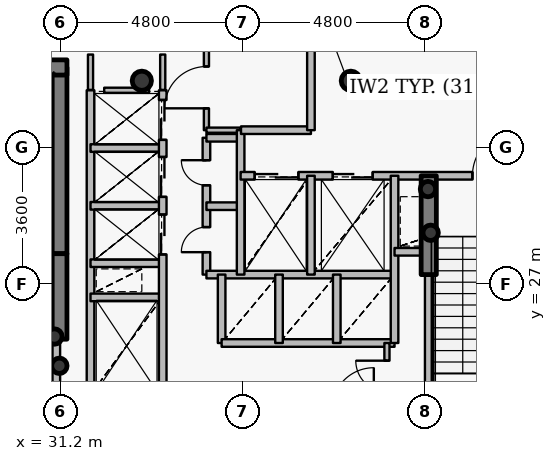
"""IFC4 building model, lengths in metres.
Left out: names, types, materials, properties, quantities, classifications, styles, units other than length and angle.
Written with IfcOpenShell. Run it as: python <this file> out.ifc"""

import sys

from ifc_helpers import new_model, si_unit, direction, frame, frame_2d, origin, origin_2d, place, context, subcontext, project, spatial, rectangle, hollow_circle, extrude, source, transform, mapped, element, fill, save


model = new_model("IFC4")
c1 = context("Model", 3, precision=1e-05, world=origin(), true_north=direction((0.0, 1.0)))
c2 = subcontext(c1, "Body", "Model", "MODEL_VIEW")
j1 = project(units=[si_unit("LENGTHUNIT", "METRE"), si_unit("PLANEANGLEUNIT", "RADIAN")], contexts=[c1])
p1 = place(None, origin())
s1 = spatial("IfcSite", under=j1, at=p1, CompositionType="ELEMENT")
p2 = place(p1, origin())
s2 = spatial("IfcBuilding", under=s1, at=p2, CompositionType="ELEMENT")
p3 = place(p2, frame((0.0, 0.0, 229.05)))
s3 = spatial("IfcBuildingStorey", under=s2, at=p3, CompositionType="ELEMENT", Elevation=229.05)
for number, where, z_axis, x_axis in (
    (1, (38.85, 32.35, 0.0), (0.0, 0.0, 1.0), (1.0, 0.0, 0.0)),
    (2, (33.35, 32.35, 0.0), (0.0, 0.0, 1.0), (1.0, 0.0, 0.0)),
):
    element("IfcColumn", number, at=place(p3, frame(where, z_axis=z_axis, x_axis=x_axis)), inside=s3, PredefinedType="COLUMN", context=c2, shape_type="SweptSolid", body=[
        extrude(hollow_circle(Radius=0.254, WallThickness=0.02, at=origin_2d()), origin(), (0.0, 0.0, 1.0), 3.75),
    ])
p4 = place(p3, frame((31.18, 27.8, 0.0), z_axis=(0.0, 0.0, 1.0), x_axis=(0.0, 1.0, 0.0)))
e3 = element("IfcWall", 3, at=p4, inside=s3, PredefinedType="SHEAR", context=c2, shape_type="SweptSolid", body=[
    extrude(rectangle(XDim=4.9, YDim=0.4, at=frame_2d((2.45, 0.0))), origin(), (0.0, 0.0, 1.0), 3.75),
])
p5 = place(p3, frame((27.28, 32.7, 0.0), z_axis=(0.0, 0.0, 1.0), x_axis=(1.0, 0.0, 0.0)))
e4 = element("IfcWall", 4, at=p5, inside=s3, PredefinedType="SHEAR", context=c2, shape_type="SweptSolid", body=[
    extrude(rectangle(XDim=4.1, YDim=0.4, at=frame_2d((2.05, 0.0))), origin(), (0.0, 0.0, 1.0), 3.75),
])
for number, where, z_axis, x_axis in (
    (5, (31.05, 25.62, 0.0), (0.0, 0.0, 1.0), (1.0, 0.0, 0.0)),
    (6, (31.18, 24.85, 0.0), (0.0, 0.0, 1.0), (1.0, 0.0, 0.0)),
    (7, (40.95, 28.35, 0.0), (0.0, 0.0, 1.0), (1.0, 0.0, 0.0)),
    (8, (40.88, 29.5, 0.0), (0.0, 0.0, 1.0), (1.0, 0.0, 0.0)),
):
    element("IfcColumn", number, at=place(p3, frame(where, z_axis=z_axis, x_axis=x_axis)), inside=s3, PredefinedType="COLUMN", context=c2, shape_type="SweptSolid", body=[
        extrude(hollow_circle(Radius=0.203, WallThickness=0.016, at=origin_2d()), origin(), (0.0, 0.0, 1.0), 3.75),
    ])
p6 = place(p3, frame((31.18, 25.55, 0.0), z_axis=(0.0, 0.0, 1.0), x_axis=(0.0, 1.0, 0.0)))
e9 = element("IfcWall", 9, at=p6, inside=s3, PredefinedType="SHEAR", context=c2, shape_type="SweptSolid", body=[
    extrude(rectangle(XDim=2.25, YDim=0.4, at=frame_2d((1.125, 0.0))), origin(), (0.0, 0.0, 1.0), 3.1),
])
p7 = place(p3, frame((40.9, 27.25, 0.0), z_axis=(0.0, 0.0, 1.0), x_axis=(0.0, 1.0, 0.0)))
e10 = element("IfcWall", 10, at=p7, inside=s3, PredefinedType="SHEAR", context=c2, shape_type="SweptSolid", body=[
    extrude(rectangle(XDim=2.6, YDim=0.4, at=frame_2d((1.3, 0.0))), origin(), (0.0, 0.0, 1.0), 3.1),
])
p8 = place(p3, frame((31.1, 24.1, 0.0), z_axis=(0.0, 0.0, 1.0), x_axis=(0.0, 1.0, 0.0)))
e11 = element("IfcWall", 11, at=p8, inside=s3, PredefinedType="PARTITIONING", context=c2, shape_type="SweptSolid", body=[
    extrude(rectangle(XDim=1.44, YDim=0.2, at=frame_2d((0.72, 0.0))), origin(), (0.0, 0.0, 1.0), 3.5),
])
p9 = place(p3, frame((32.0, 24.1, 0.0), z_axis=(0.0, 0.0, 1.0), x_axis=(0.0, 1.0, 0.0)))
e12 = element("IfcWall", 12, at=p9, inside=s3, PredefinedType="PARTITIONING", context=c2, shape_type="SweptSolid", body=[
    extrude(rectangle(XDim=8.0, YDim=0.2, at=frame_2d((4.0, 0.0))), origin(), (0.0, 0.0, 1.0), 3.5),
])
for number, where, z_axis, x_axis in (
    (13, (32.0, 26.65, 0.0), (0.0, 0.0, 1.0), (1.0, 0.0, 0.0)),
    (14, (32.0, 27.55, 0.0), (0.0, 0.0, 1.0), (1.0, 0.0, 0.0)),
    (15, (32.0, 29.06, 0.0), (0.0, 0.0, 1.0), (1.0, 0.0, 0.0)),
    (16, (32.0, 30.58, 0.0), (0.0, 0.0, 1.0), (1.0, 0.0, 0.0)),
):
    element("IfcWall", number, at=place(p3, frame(where, z_axis=z_axis, x_axis=x_axis)), inside=s3, PredefinedType="PARTITIONING", context=c2, shape_type="SweptSolid", body=[
        extrude(rectangle(XDim=1.9, YDim=0.2, at=frame_2d((0.95, 0.0))), origin(), (0.0, 0.0, 1.0), 3.085),
    ])
p10 = place(p3, frame((33.9, 20.7, 0.0), z_axis=(0.0, 0.0, 1.0), x_axis=(0.0, 1.0, 0.0)))
e17 = element("IfcWall", 17, at=p10, inside=s3, PredefinedType="PARTITIONING", context=c2, shape_type="SweptSolid", body=[
    extrude(rectangle(XDim=11.4, YDim=0.2, at=frame_2d((5.7, 0.0))), origin(), (0.0, 0.0, 1.0), 3.085),
])
p11 = place(p10, frame((7.08, 0.0, 0.0)))
e18 = element("IfcOpeningElement", 18, at=p11, cuts=e17, PredefinedType="OPENING", context=c2, shape_type="SweptSolid", body=[
    extrude(rectangle(XDim=1.05, YDim=2.15, at=origin_2d()), frame((0.525, 0.11, 1.075), z_axis=(0.0, -1.0, 0.0), x_axis=(1.0, 0.0, 0.0)), (0.0, 0.0, 1.0), 0.22),
])
p12 = place(p10, frame((8.595, 0.0, 0.0)))
e19 = element("IfcOpeningElement", 19, at=p12, cuts=e17, PredefinedType="OPENING", context=c2, shape_type="SweptSolid", body=[
    extrude(rectangle(XDim=1.05, YDim=2.15, at=origin_2d()), frame((0.525, 0.11, 1.075), z_axis=(0.0, -1.0, 0.0), x_axis=(1.0, 0.0, 0.0)), (0.0, 0.0, 1.0), 0.22),
])
p13 = place(p10, frame((10.095, 0.0, 0.0)))
e20 = element("IfcOpeningElement", 20, at=p13, cuts=e17, PredefinedType="OPENING", context=c2, shape_type="SweptSolid", body=[
    extrude(rectangle(XDim=1.05, YDim=2.15, at=origin_2d()), frame((0.525, 0.11, 1.075), z_axis=(0.0, -1.0, 0.0), x_axis=(1.0, 0.0, 0.0)), (0.0, 0.0, 1.0), 0.22),
])
p14 = place(p3, frame((35.05, 27.25, 0.0), z_axis=(0.0, 0.0, 1.0), x_axis=(0.0, 1.0, 0.0)))
e21 = element("IfcWall", 21, at=p14, inside=s3, PredefinedType="PARTITIONING", context=c2, shape_type="SweptSolid", body=[
    extrude(rectangle(XDim=3.6, YDim=0.2, at=frame_2d((1.8, 0.0))), origin(), (0.0, 0.0, 1.0), 3.5),
])
p15 = place(p14, frame((0.59, 0.0, 0.0)))
e22 = element("IfcOpeningElement", 22, at=p15, cuts=e21, PredefinedType="OPENING", context=c2, shape_type="SweptSolid", body=[
    extrude(rectangle(XDim=0.66, YDim=2.05, at=origin_2d()), frame((0.33, 0.11, 1.025), z_axis=(0.0, -1.0, 0.0), x_axis=(1.0, 0.0, 0.0)), (0.0, 0.0, 1.0), 0.22),
])
p16 = place(p14, frame((2.35, 0.0, 0.0)))
e23 = element("IfcOpeningElement", 23, at=p16, cuts=e21, PredefinedType="OPENING", context=c2, shape_type="SweptSolid", body=[
    extrude(rectangle(XDim=0.66, YDim=2.05, at=origin_2d()), frame((0.33, 0.11, 1.025), z_axis=(0.0, -1.0, 0.0), x_axis=(1.0, 0.0, 0.0)), (0.0, 0.0, 1.0), 0.22),
])
p17 = place(p3, frame((35.05, 27.25, 0.0), z_axis=(0.0, 0.0, 1.0), x_axis=(1.0, 0.0, 0.0)))
e24 = element("IfcWall", 24, at=p17, inside=s3, PredefinedType="PARTITIONING", context=c2, shape_type="SweptSolid", body=[
    extrude(rectangle(XDim=4.95, YDim=0.2, at=frame_2d((2.475, 0.0))), origin(), (0.0, 0.0, 1.0), 3.085),
])
for number, where, z_axis, x_axis in (
    (25, (35.05, 29.05, 0.0), (0.0, 0.0, 1.0), (1.0, 0.0, 0.0)),
    (26, (35.05, 30.85, 0.0), (0.0, 0.0, 1.0), (1.0, 0.0, 0.0)),
):
    element("IfcWall", number, at=place(p3, frame(where, z_axis=z_axis, x_axis=x_axis)), inside=s3, PredefinedType="PARTITIONING", context=c2, shape_type="SweptSolid", body=[
        extrude(rectangle(XDim=0.9, YDim=0.2, at=frame_2d((0.45, 0.0))), origin(), (0.0, 0.0, 1.0), 3.5),
    ])
p18 = place(p3, frame((35.05, 31.05, 0.0), z_axis=(0.0, 0.0, 1.0), x_axis=(0.0, 1.0, 0.0)))
e27 = element("IfcWall", 27, at=p18, inside=s3, PredefinedType="PARTITIONING", context=c2, shape_type="SweptSolid", body=[
    extrude(rectangle(XDim=2.25, YDim=0.135, at=frame_2d((1.125, 0.0))), origin(), (0.0, 0.0, 1.0), 3.085),
])
p19 = place(p18, frame((0.575, 0.0, 0.0)))
e28 = element("IfcOpeningElement", 28, at=p19, cuts=e27, PredefinedType="OPENING", context=c2, shape_type="SweptSolid", body=[
    extrude(rectangle(XDim=1.1, YDim=2.15, at=origin_2d()), frame((0.55, 0.078, 1.075), z_axis=(0.0, -1.0, 0.0), x_axis=(1.0, 0.0, 0.0)), (0.0, 0.0, 1.0), 0.155),
])
p20 = place(p3, frame((35.05, 31.05, 0.0), z_axis=(0.0, 0.0, 1.0), x_axis=(1.0, 0.0, 0.0)))
e29 = element("IfcWall", 29, at=p20, inside=s3, PredefinedType="PARTITIONING", context=c2, shape_type="SweptSolid", body=[
    extrude(rectangle(XDim=0.9, YDim=0.135, at=frame_2d((0.45, 0.0))), origin(), (0.0, 0.0, 1.0), 3.5),
])
p21 = place(p3, frame((35.45, 25.45, 0.0), z_axis=(0.0, 0.0, 1.0), x_axis=(0.0, 1.0, 0.0)))
e30 = element("IfcWall", 30, at=p21, inside=s3, PredefinedType="PARTITIONING", context=c2, shape_type="SweptSolid", body=[
    extrude(rectangle(XDim=1.8, YDim=0.2, at=frame_2d((0.9, 0.0))), origin(), (0.0, 0.0, 1.0), 3.5),
])
p22 = place(p3, frame((35.45, 25.45, 0.0), z_axis=(0.0, 0.0, 1.0), x_axis=(1.0, 0.0, 0.0)))
e31 = element("IfcWall", 31, at=p22, inside=s3, PredefinedType="PARTITIONING", context=c2, shape_type="SweptSolid", body=[
    extrude(rectangle(XDim=4.55, YDim=0.2, at=frame_2d((2.275, 0.0))), origin(), (0.0, 0.0, 1.0), 3.085),
])
p23 = place(p3, frame((35.95, 27.25, 0.0), z_axis=(0.0, 0.0, 1.0), x_axis=(0.0, 1.0, 0.0)))
e32 = element("IfcWall", 32, at=p23, inside=s3, PredefinedType="PARTITIONING", context=c2, shape_type="SweptSolid", body=[
    extrude(rectangle(XDim=3.8, YDim=0.2, at=frame_2d((1.9, 0.0))), origin(), (0.0, 0.0, 1.0), 3.5),
])
p24 = place(p3, frame((35.95, 29.85, 0.0), z_axis=(0.0, 0.0, 1.0), x_axis=(1.0, 0.0, 0.0)))
e33 = element("IfcWall", 33, at=p24, inside=s3, PredefinedType="PARTITIONING", context=c2, shape_type="SweptSolid", body=[
    extrude(rectangle(XDim=8.49, YDim=0.2, at=frame_2d((4.245, 0.0))), origin(), (0.0, 0.0, 1.0), 3.085),
])
p25 = place(p24, frame((6.1, 0.0, 0.0)))
e34 = element("IfcOpeningElement", 34, at=p25, cuts=e33, PredefinedType="OPENING", context=c2, shape_type="SweptSolid", body=[
    extrude(rectangle(XDim=1.2, YDim=2.15, at=origin_2d()), frame((0.6, 0.11, 1.075), z_axis=(0.0, -1.0, 0.0), x_axis=(1.0, 0.0, 0.0)), (0.0, 0.0, 1.0), 0.22),
])
p26 = place(p24, frame((0.37, 0.0, 0.0)))
e35 = element("IfcOpeningElement", 35, at=p26, cuts=e33, PredefinedType="OPENING", context=c2, shape_type="SweptSolid", body=[
    extrude(rectangle(XDim=1.15, YDim=2.15, at=origin_2d()), frame((0.575, 0.11, 1.075), z_axis=(0.0, -1.0, 0.0), x_axis=(1.0, 0.0, 0.0)), (0.0, 0.0, 1.0), 0.22),
])
p27 = place(p24, frame((2.425, 0.0, 0.0)))
e36 = element("IfcOpeningElement", 36, at=p27, cuts=e33, PredefinedType="OPENING", context=c2, shape_type="SweptSolid", body=[
    extrude(rectangle(XDim=1.05, YDim=2.15, at=origin_2d()), frame((0.525, 0.11, 1.075), z_axis=(0.0, -1.0, 0.0), x_axis=(1.0, 0.0, 0.0)), (0.0, 0.0, 1.0), 0.22),
])
p28 = place(p3, frame((35.96, 31.05, 0.0), z_axis=(0.0, 0.0, 1.0), x_axis=(1.0, 0.0, 0.0)))
e37 = element("IfcWall", 37, at=p28, inside=s3, PredefinedType="PARTITIONING", context=c2, shape_type="SweptSolid", body=[
    extrude(rectangle(XDim=1.84, YDim=0.2, at=frame_2d((0.92, 0.0))), origin(), (0.0, 0.0, 1.0), 3.5),
])
p29 = place(p3, frame((36.96, 25.45, 0.0), z_axis=(0.0, 0.0, 1.0), x_axis=(0.0, 1.0, 0.0)))
e38 = element("IfcWall", 38, at=p29, inside=s3, PredefinedType="PARTITIONING", context=c2, shape_type="SweptSolid", body=[
    extrude(rectangle(XDim=1.8, YDim=0.2, at=frame_2d((0.9, 0.0))), origin(), (0.0, 0.0, 1.0), 3.5),
])
p30 = place(p3, frame((37.8, 27.25, 0.0), z_axis=(0.0, 0.0, 1.0), x_axis=(0.0, 1.0, 0.0)))
e39 = element("IfcWall", 39, at=p30, inside=s3, PredefinedType="PARTITIONING", context=c2, shape_type="SweptSolid", body=[
    extrude(rectangle(XDim=2.6, YDim=0.2, at=frame_2d((1.3, 0.0))), origin(), (0.0, 0.0, 1.0), 3.5),
])
p31 = place(p3, frame((37.8, 31.05, 0.0), z_axis=(0.0, 0.0, 1.0), x_axis=(0.0, 1.0, 0.0)))
e40 = element("IfcWall", 40, at=p31, inside=s3, PredefinedType="PARTITIONING", context=c2, shape_type="SweptSolid", body=[
    extrude(rectangle(XDim=2.25, YDim=0.2, at=frame_2d((1.125, 0.0))), origin(), (0.0, 0.0, 1.0), 3.085),
])
p32 = place(p3, frame((38.48, 25.45, 0.0), z_axis=(0.0, 0.0, 1.0), x_axis=(0.0, 1.0, 0.0)))
e41 = element("IfcWall", 41, at=p32, inside=s3, PredefinedType="PARTITIONING", context=c2, shape_type="SweptSolid", body=[
    extrude(rectangle(XDim=1.8, YDim=0.2, at=frame_2d((0.9, 0.0))), origin(), (0.0, 0.0, 1.0), 3.5),
])
p33 = place(p3, frame((39.8, 23.7, 0.0), z_axis=(0.0, 0.0, 1.0), x_axis=(0.0, 1.0, 0.0)))
e42 = element("IfcWall", 42, at=p33, inside=s3, PredefinedType="PARTITIONING", context=c2, shape_type="SweptSolid", body=[
    extrude(rectangle(XDim=1.75, YDim=0.135, at=frame_2d((0.875, 0.0))), origin(), (0.0, 0.0, 1.0), 3.5),
])
p34 = place(p33, frame((0.465, 0.0, 0.0)))
e43 = element("IfcOpeningElement", 43, at=p34, cuts=e42, PredefinedType="OPENING", context=c2, shape_type="SweptSolid", body=[
    extrude(rectangle(XDim=0.82, YDim=2.1, at=origin_2d()), frame((0.41, 0.078, 1.05), z_axis=(0.0, -1.0, 0.0), x_axis=(1.0, 0.0, 0.0)), (0.0, 0.0, 1.0), 0.155),
])
p35 = place(p3, frame((40.0, 25.45, 0.0), z_axis=(0.0, 0.0, 1.0), x_axis=(0.0, 1.0, 0.0)))
e44 = element("IfcWall", 44, at=p35, inside=s3, PredefinedType="PARTITIONING", context=c2, shape_type="SweptSolid", body=[
    extrude(rectangle(XDim=4.4, YDim=0.2, at=frame_2d((2.2, 0.0))), origin(), (0.0, 0.0, 1.0), 3.5),
])
p36 = place(p3, frame((40.0, 27.85, 0.0), z_axis=(0.0, 0.0, 1.0), x_axis=(1.0, 0.0, 0.0)))
e45 = element("IfcWall", 45, at=p36, inside=s3, PredefinedType="PARTITIONING", context=c2, shape_type="SweptSolid", body=[
    extrude(rectangle(XDim=0.9, YDim=0.2, at=frame_2d((0.45, 0.0))), origin(), (0.0, 0.0, 1.0), 3.5),
])
p37 = place(p3, frame((40.9, 21.33, 0.0), z_axis=(0.0, 0.0, 1.0), x_axis=(0.0, 1.0, 0.0)))
e46 = element("IfcWall", 46, at=p37, inside=s3, PredefinedType="PARTITIONING", context=c2, shape_type="SweptSolid", body=[
    extrude(rectangle(XDim=5.91, YDim=0.2, at=frame_2d((2.955, 0.0))), origin(), (0.0, 0.0, 1.0), 3.035),
])
p38 = place(p3, frame((32.36, 32.1, 0.0), z_axis=(0.0, 0.0, 1.0), x_axis=(1.0, 0.0, 0.0)))
e47 = element("IfcWall", 47, at=p38, inside=s3, PredefinedType="PARTITIONING", context=c2, shape_type="SweptSolid", body=[
    extrude(rectangle(XDim=1.18, YDim=0.135, at=frame_2d((0.59, 0.0))), origin(), (0.0, 0.0, 1.0), 3.085),
])
p39 = place(p3, frame((32.0, 33.04, 0.0), z_axis=(0.0, 0.0, 1.0), x_axis=(0.0, -1.0, 0.0)))
e48 = element("IfcWall", 48, at=p39, inside=s3, PredefinedType="PARTITIONING", context=c2, shape_type="SweptSolid", body=[
    extrude(rectangle(XDim=0.93, YDim=0.135, at=frame_2d((0.465, 0.0))), origin(), (0.0, 0.0, 1.0), 3.035),
])
p40 = place(p3, frame((33.9, 32.11, 0.0), z_axis=(0.0, 0.0, 1.0), x_axis=(0.0, 1.0, 0.0)))
e49 = element("IfcWall", 49, at=p40, inside=s3, PredefinedType="PARTITIONING", context=c2, shape_type="SweptSolid", body=[
    extrude(rectangle(XDim=0.93, YDim=0.135, at=frame_2d((0.465, 0.0))), origin(), (0.0, 0.0, 1.0), 3.085),
])
m1 = source(origin(), c2, "Body", "SweptSolid", [
    extrude(rectangle(XDim=1.2, YDim=2.15, at=origin_2d()), frame((0.6, 0.025, 1.075), z_axis=(0.0, -1.0, 0.0), x_axis=(1.0, 0.0, 0.0)), (0.0, 0.0, 1.0), 0.05),
])
p41 = place(p25, origin())
e50 = element("IfcDoor", 50, at=p41, inside=s3, OperationType="SINGLE_SWING_RIGHT", PredefinedType="DOOR", context=c2, shape_type="MappedRepresentation", body=[
    mapped(m1, transform((0.0, 0.0, 0.0), x_axis=(1.0, 0.0, 0.0), y_axis=(0.0, 1.0, 0.0), z_axis=(0.0, 0.0, 1.0), scale=1.0)),
])
fill(e34, e50)
m2 = source(origin(), c2, "Body", "SweptSolid", [
    extrude(rectangle(XDim=1.15, YDim=2.15, at=origin_2d()), frame((0.575, 0.025, 1.075), z_axis=(0.0, -1.0, 0.0), x_axis=(1.0, 0.0, 0.0)), (0.0, 0.0, 1.0), 0.05),
])
p42 = place(p26, origin())
e51 = element("IfcDoor", 51, at=p42, inside=s3, OperationType="DOUBLE_DOOR_SLIDING", PredefinedType="USERDEFINED", context=c2, shape_type="MappedRepresentation", body=[
    mapped(m2, transform((0.0, 0.0, 0.0), x_axis=(1.0, 0.0, 0.0), y_axis=(0.0, 1.0, 0.0), z_axis=(0.0, 0.0, 1.0), scale=1.0)),
])
fill(e35, e51)
m3 = source(origin(), c2, "Body", "SweptSolid", [
    extrude(rectangle(XDim=1.05, YDim=2.15, at=origin_2d()), frame((0.525, 0.025, 1.075), z_axis=(0.0, -1.0, 0.0), x_axis=(1.0, 0.0, 0.0)), (0.0, 0.0, 1.0), 0.05),
])
p43 = place(p27, origin())
e52 = element("IfcDoor", 52, at=p43, inside=s3, OperationType="DOUBLE_DOOR_SLIDING", PredefinedType="USERDEFINED", context=c2, shape_type="MappedRepresentation", body=[
    mapped(m3, transform((0.0, 0.0, 0.0), x_axis=(1.0, 0.0, 0.0), y_axis=(0.0, 1.0, 0.0), z_axis=(0.0, 0.0, 1.0), scale=1.0)),
])
fill(e36, e52)
p44 = place(p11, origin())
e53 = element("IfcDoor", 53, at=p44, inside=s3, OperationType="DOUBLE_DOOR_SLIDING", PredefinedType="USERDEFINED", context=c2, shape_type="MappedRepresentation", body=[
    mapped(m3, transform((0.0, 0.0, 0.0), x_axis=(1.0, 0.0, 0.0), y_axis=(0.0, 1.0, 0.0), z_axis=(0.0, 0.0, 1.0), scale=1.0)),
])
fill(e18, e53)
p45 = place(p12, origin())
e54 = element("IfcDoor", 54, at=p45, inside=s3, OperationType="DOUBLE_DOOR_SLIDING", PredefinedType="USERDEFINED", context=c2, shape_type="MappedRepresentation", body=[
    mapped(m3, transform((0.0, 0.0, 0.0), x_axis=(1.0, 0.0, 0.0), y_axis=(0.0, 1.0, 0.0), z_axis=(0.0, 0.0, 1.0), scale=1.0)),
])
fill(e19, e54)
p46 = place(p13, origin())
e55 = element("IfcDoor", 55, at=p46, inside=s3, OperationType="DOUBLE_DOOR_SLIDING", PredefinedType="USERDEFINED", context=c2, shape_type="MappedRepresentation", body=[
    mapped(m3, transform((0.0, 0.0, 0.0), x_axis=(1.0, 0.0, 0.0), y_axis=(0.0, 1.0, 0.0), z_axis=(0.0, 0.0, 1.0), scale=1.0)),
])
fill(e20, e55)
m4 = source(origin(), c2, "Body", "SweptSolid", [
    extrude(rectangle(XDim=0.66, YDim=2.05, at=origin_2d()), frame((0.33, 0.025, 1.025), z_axis=(0.0, -1.0, 0.0), x_axis=(1.0, 0.0, 0.0)), (0.0, 0.0, 1.0), 0.05),
])
p47 = place(p15, origin())
e56 = element("IfcDoor", 56, at=p47, inside=s3, OperationType="SINGLE_SWING_LEFT", PredefinedType="USERDEFINED", context=c2, shape_type="MappedRepresentation", body=[
    mapped(m4, transform((0.0, 0.0, 0.0), x_axis=(1.0, 0.0, 0.0), y_axis=(0.0, 1.0, 0.0), z_axis=(0.0, 0.0, 1.0), scale=1.0)),
])
fill(e22, e56)
p48 = place(p16, origin())
e57 = element("IfcDoor", 57, at=p48, inside=s3, OperationType="SINGLE_SWING_RIGHT", PredefinedType="USERDEFINED", context=c2, shape_type="MappedRepresentation", body=[
    mapped(m4, transform((0.0, 0.0, 0.0), x_axis=(1.0, 0.0, 0.0), y_axis=(0.0, 1.0, 0.0), z_axis=(0.0, 0.0, 1.0), scale=1.0)),
])
fill(e23, e57)
m5 = source(origin(), c2, "Body", "SweptSolid", [
    extrude(rectangle(XDim=1.1, YDim=2.15, at=origin_2d()), frame((0.55, 0.025, 1.075), z_axis=(0.0, -1.0, 0.0), x_axis=(1.0, 0.0, 0.0)), (0.0, 0.0, 1.0), 0.05),
])
p49 = place(p19, origin())
e58 = element("IfcDoor", 58, at=p49, inside=s3, OperationType="SINGLE_SWING_LEFT", PredefinedType="DOOR", context=c2, shape_type="MappedRepresentation", body=[
    mapped(m5, transform((0.0, 0.0, 0.0), x_axis=(1.0, 0.0, 0.0), y_axis=(0.0, 1.0, 0.0), z_axis=(0.0, 0.0, 1.0), scale=1.0)),
])
fill(e28, e58)
m6 = source(origin(), c2, "Body", "SweptSolid", [
    extrude(rectangle(XDim=0.82, YDim=2.1, at=origin_2d()), frame((0.41, 0.025, 1.05), z_axis=(0.0, -1.0, 0.0), x_axis=(1.0, 0.0, 0.0)), (0.0, 0.0, 1.0), 0.05),
])
p50 = place(p34, origin())
e59 = element("IfcDoor", 59, at=p50, inside=s3, OperationType="SINGLE_SWING_RIGHT", PredefinedType="DOOR", context=c2, shape_type="MappedRepresentation", body=[
    mapped(m6, transform((0.0, 0.0, 0.0), x_axis=(1.0, 0.0, 0.0), y_axis=(0.0, 1.0, 0.0), z_axis=(0.0, 0.0, 1.0), scale=1.0)),
])
fill(e43, e59)
save(model, sys.argv[1])
